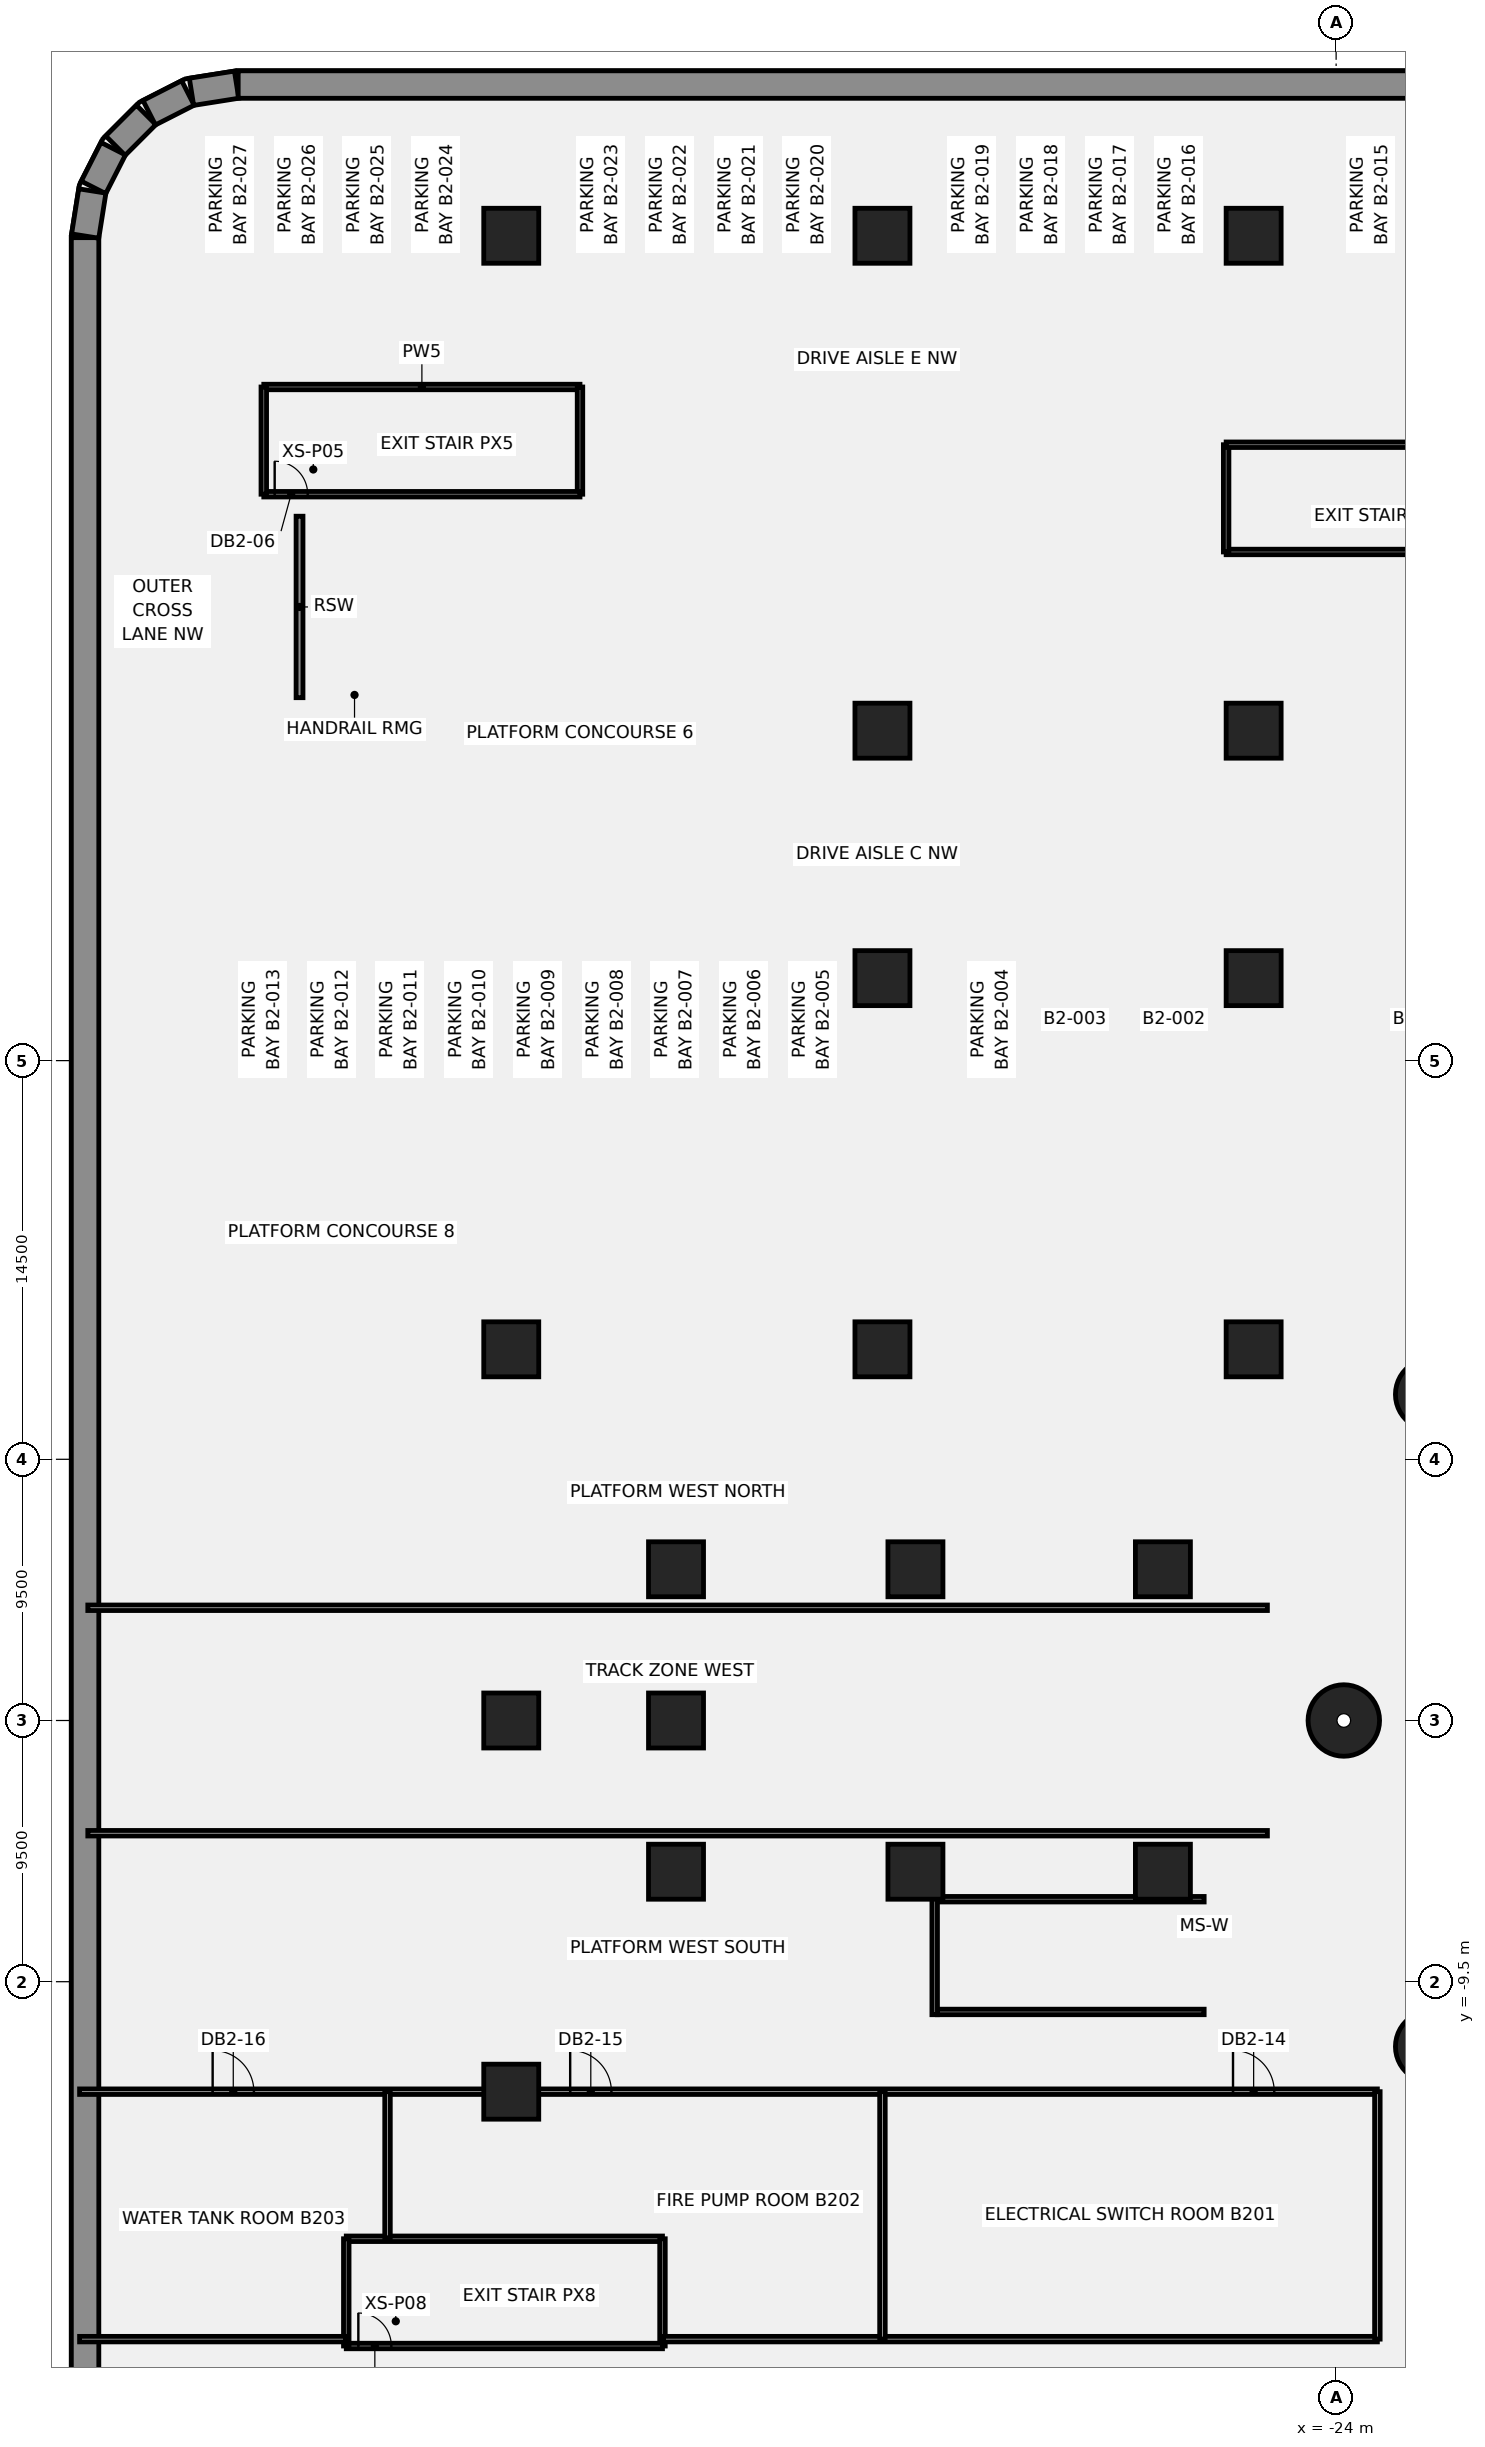
"""IFC4 building model, lengths in metres.
Left out: names, types, materials, properties, quantities, classifications, styles, units other than length and angle.
Written with IfcOpenShell. Run it as: python <this file> out.ifc"""

import sys

from ifc_helpers import new_model, si_unit, direction, frame, frame_2d, origin, origin_2d, place, context, subcontext, project, spatial, rectangle, circle, extrude, element, fill, save


model = new_model("IFC4")
c1 = context("Model", 3, precision=1e-05, world=origin(), true_north=direction((0.0, 1.0)))
c2 = subcontext(c1, "Body", "Model", "MODEL_VIEW")
j1 = project(units=[si_unit("LENGTHUNIT", "METRE"), si_unit("PLANEANGLEUNIT", "RADIAN")], contexts=[c1])
p1 = place(None, origin())
s1 = spatial("IfcSite", under=j1, at=p1, CompositionType="ELEMENT")
p2 = place(p1, origin())
s2 = spatial("IfcBuilding", under=s1, at=p2, CompositionType="ELEMENT")
p3 = place(p2, frame((0.0, 0.0, -14.0)))
s3 = spatial("IfcBuildingStorey", under=s2, at=p3, CompositionType="ELEMENT", Elevation=-14.0)
p4 = place(p3, frame((-69.5, -53.931, -0.45), z_axis=(0.0, 0.0, 1.0), x_axis=(0.0, 1.0, 0.0)))
e1 = element("IfcWall", 1, at=p4, inside=s3, PredefinedType="SOLIDWALL", context=c2, shape_type="SweptSolid", body=[
    extrude(rectangle(XDim=107.863, YDim=1.0, at=frame_2d((53.931, 0.0))), origin(), (0.0, 0.0, 1.0), 7.0),
])
p5 = place(p3, frame((-69.495, 53.99, -0.45), z_axis=(0.0, 0.0, 1.0), x_axis=(0.156430639922, 0.987688946427, 0.0)))
e2 = element("IfcWall", 2, at=p5, inside=s3, PredefinedType="SOLIDWALL", context=c2, shape_type="SweptSolid", body=[
    extrude(rectangle(XDim=1.661, YDim=1.0, at=frame_2d((0.83, 0.0))), origin(), (0.0, 0.0, 1.0), 7.0),
])
for number, where, z_axis, x_axis in (
    (3, (-69.194, 55.759, -0.45), (0.0, 0.0, 1.0), (0.454, 0.891, 0.0)),
    (4, (-68.396, 57.278, -0.45), (0.0, 0.0, 1.0), (0.707, 0.707, 0.0)),
    (5, (-67.168, 58.476, -0.45), (0.0, 0.0, 1.0), (0.891, 0.454, 0.0)),
):
    element("IfcWall", number, at=place(p3, frame(where, z_axis=z_axis, x_axis=x_axis)), inside=s3, PredefinedType="SOLIDWALL", context=c2, shape_type="SweptSolid", body=[
        extrude(rectangle(XDim=1.581, YDim=1.0, at=frame_2d((0.791, 0.0))), origin(), (0.0, 0.0, 1.0), 7.0),
    ])
p6 = place(p3, frame((-65.63, 59.236, -0.45), z_axis=(0.0, 0.0, 1.0), x_axis=(0.987688946427, 0.156430639922, 0.0)))
e6 = element("IfcWall", 6, at=p6, inside=s3, PredefinedType="SOLIDWALL", context=c2, shape_type="SweptSolid", body=[
    extrude(rectangle(XDim=1.661, YDim=1.0, at=frame_2d((0.83, 0.0))), origin(), (0.0, 0.0, 1.0), 7.0),
])
p7 = place(p3, frame((-63.931, 59.5, -0.45), z_axis=(0.0, 0.0, 1.0), x_axis=(1.0, 0.0, 0.0)))
e7 = element("IfcWall", 7, at=p7, inside=s3, PredefinedType="SOLIDWALL", context=c2, shape_type="SweptSolid", body=[
    extrude(rectangle(XDim=127.863, YDim=1.0, at=frame_2d((63.931, 0.0))), origin(), (0.0, 0.0, 1.0), 7.0),
])
for number, where, z_axis, x_axis in (
    (8, (-20.543, 11.86, -0.45), (0.0, 0.0, 1.0), (1.0, 0.0, 0.0)),
    (9, (-23.721, 0.0, -0.45), (0.0, 0.0, 1.0), (1.0, 0.0, 0.0)),
    (10, (-20.543, -11.86, -0.45), (0.0, 0.0, 1.0), (1.0, 0.0, 0.0)),
):
    element("IfcColumn", number, at=place(p3, frame(where, z_axis=z_axis, x_axis=x_axis)), inside=s3, PredefinedType="COLUMN", context=c2, shape_type="SweptSolid", body=[
        extrude(circle(Radius=1.3, at=origin_2d()), origin(), (0.0, 0.0, 1.0), 7.0),
    ])
for number, where, z_axis, x_axis in (
    (11, (-39.3, -5.5, -0.45), (0.0, 0.0, 1.0), (1.0, 0.0, 0.0)),
    (12, (-39.3, 5.5, -0.45), (0.0, 0.0, 1.0), (1.0, 0.0, 0.0)),
    (13, (-30.3, -5.5, -0.45), (0.0, 0.0, 1.0), (1.0, 0.0, 0.0)),
    (14, (-30.3, 5.5, -0.45), (0.0, 0.0, 1.0), (1.0, 0.0, 0.0)),
    (15, (-48.008, 5.5, -0.45), (0.0, 0.0, 1.0), (1.0, 0.0, 0.0)),
    (16, (-48.008, 0.0, -0.45), (0.0, 0.0, 1.0), (1.0, 0.0, 0.0)),
    (17, (-48.008, -5.5, -0.45), (0.0, 0.0, 1.0), (1.0, 0.0, 0.0)),
    (18, (-54.0, -13.5, -0.45), (0.0, 0.0, 1.0), (1.0, 0.0, 0.0)),
    (19, (-54.0, 0.0, -0.45), (0.0, 0.0, 1.0), (1.0, 0.0, 0.0)),
    (20, (-54.0, 13.5, -0.45), (0.0, 0.0, 1.0), (1.0, 0.0, 0.0)),
    (21, (-54.0, 54.0, -0.45), (0.0, 0.0, 1.0), (1.0, 0.0, 0.0)),
    (22, (-40.5, 13.5, -0.45), (0.0, 0.0, 1.0), (1.0, 0.0, 0.0)),
    (23, (-40.5, 27.0, -0.45), (0.0, 0.0, 1.0), (1.0, 0.0, 0.0)),
    (24, (-40.5, 36.0, -0.45), (0.0, 0.0, 1.0), (1.0, 0.0, 0.0)),
    (25, (-40.5, 54.0, -0.45), (0.0, 0.0, 1.0), (1.0, 0.0, 0.0)),
    (26, (-27.0, 13.5, -0.45), (0.0, 0.0, 1.0), (1.0, 0.0, 0.0)),
    (27, (-27.0, 27.0, -0.45), (0.0, 0.0, 1.0), (1.0, 0.0, 0.0)),
    (28, (-27.0, 36.0, -0.45), (0.0, 0.0, 1.0), (1.0, 0.0, 0.0)),
    (29, (-27.0, 54.0, -0.45), (0.0, 0.0, 1.0), (1.0, 0.0, 0.0)),
):
    element("IfcColumn", number, at=place(p3, frame(where, z_axis=z_axis, x_axis=x_axis)), inside=s3, PredefinedType="COLUMN", context=c2, shape_type="SweptSolid", body=[
        extrude(rectangle(XDim=2.0, YDim=2.0, at=origin_2d()), origin(), (0.0, 0.0, 1.0), 7.0),
    ])
p8 = place(p3, frame((-63.0, 48.5, 0.0), z_axis=(0.0, 0.0, 1.0), x_axis=(1.0, 0.0, 0.0)))
e30 = element("IfcWall", 30, at=p8, inside=s3, PredefinedType="PARTITIONING", context=c2, shape_type="SweptSolid", body=[
    extrude(rectangle(XDim=11.5, YDim=0.2, at=frame_2d((5.75, 0.0))), origin(), (0.0, 0.0, 1.0), 6.55),
])
p9 = place(p3, frame((-51.5, 44.6, 0.0), z_axis=(0.0, 0.0, 1.0), x_axis=(0.0, 1.0, 0.0)))
e31 = element("IfcWall", 31, at=p9, inside=s3, PredefinedType="PARTITIONING", context=c2, shape_type="SweptSolid", body=[
    extrude(rectangle(XDim=3.9, YDim=0.2, at=frame_2d((1.95, 0.0))), origin(), (0.0, 0.0, 1.0), 6.55),
])
p10 = place(p3, frame((-63.0, 44.6, 0.0), z_axis=(0.0, 0.0, 1.0), x_axis=(1.0, 0.0, 0.0)))
e32 = element("IfcWall", 32, at=p10, inside=s3, PredefinedType="PARTITIONING", context=c2, shape_type="SweptSolid", body=[
    extrude(rectangle(XDim=11.5, YDim=0.2, at=frame_2d((5.75, 0.0))), origin(), (0.0, 0.0, 1.0), 6.55),
])
p11 = place(p10, frame((0.396, 0.0, 0.0)))
e33 = element("IfcOpeningElement", 33, at=p11, cuts=e32, PredefinedType="OPENING", context=c2, shape_type="SweptSolid", body=[
    extrude(rectangle(XDim=1.2, YDim=2.1, at=frame_2d((0.6, 1.05))), frame((0.0, 0.11, 0.0), z_axis=(0.0, -1.0, 0.0), x_axis=(1.0, 0.0, 0.0)), (0.0, 0.0, 1.0), 0.22),
])
p12 = place(p3, frame((-63.0, 44.6, 0.0), z_axis=(0.0, 0.0, 1.0), x_axis=(0.0, 1.0, 0.0)))
e34 = element("IfcWall", 34, at=p12, inside=s3, PredefinedType="PARTITIONING", context=c2, shape_type="SweptSolid", body=[
    extrude(rectangle(XDim=3.9, YDim=0.2, at=frame_2d((1.95, 0.0))), origin(), (0.0, 0.0, 1.0), 6.55),
])
p13 = place(p3, frame((-60.0, -18.85, 0.0), z_axis=(0.0, 0.0, 1.0), x_axis=(1.0, 0.0, 0.0)))
e35 = element("IfcWall", 35, at=p13, inside=s3, PredefinedType="PARTITIONING", context=c2, shape_type="SweptSolid", body=[
    extrude(rectangle(XDim=11.5, YDim=0.2, at=frame_2d((5.75, 0.0))), origin(), (0.0, 0.0, 1.0), 6.55),
])
p14 = place(p3, frame((-48.5, -22.75, 0.0), z_axis=(0.0, 0.0, 1.0), x_axis=(0.0, 1.0, 0.0)))
e36 = element("IfcWall", 36, at=p14, inside=s3, PredefinedType="PARTITIONING", context=c2, shape_type="SweptSolid", body=[
    extrude(rectangle(XDim=3.9, YDim=0.2, at=frame_2d((1.95, 0.0))), origin(), (0.0, 0.0, 1.0), 6.55),
])
p15 = place(p3, frame((-60.0, -22.75, 0.0), z_axis=(0.0, 0.0, 1.0), x_axis=(1.0, 0.0, 0.0)))
e37 = element("IfcWall", 37, at=p15, inside=s3, PredefinedType="PARTITIONING", context=c2, shape_type="SweptSolid", body=[
    extrude(rectangle(XDim=11.5, YDim=0.2, at=frame_2d((5.75, 0.0))), origin(), (0.0, 0.0, 1.0), 6.55),
])
p16 = place(p15, frame((0.439, 0.0, 0.0)))
e38 = element("IfcOpeningElement", 38, at=p16, cuts=e37, PredefinedType="OPENING", context=c2, shape_type="SweptSolid", body=[
    extrude(rectangle(XDim=1.2, YDim=2.1, at=frame_2d((0.6, 1.05))), frame((0.0, 0.11, 0.0), z_axis=(0.0, -1.0, 0.0), x_axis=(1.0, 0.0, 0.0)), (0.0, 0.0, 1.0), 0.22),
])
p17 = place(p3, frame((-60.0, -22.75, 0.0), z_axis=(0.0, 0.0, 1.0), x_axis=(0.0, 1.0, 0.0)))
e39 = element("IfcWall", 39, at=p17, inside=s3, PredefinedType="PARTITIONING", context=c2, shape_type="SweptSolid", body=[
    extrude(rectangle(XDim=3.9, YDim=0.2, at=frame_2d((1.95, 0.0))), origin(), (0.0, 0.0, 1.0), 6.55),
])
p18 = place(p3, frame((-28.0, 42.5, 0.0), z_axis=(0.0, 0.0, 1.0), x_axis=(1.0, 0.0, 0.0)))
e40 = element("IfcWall", 40, at=p18, inside=s3, PredefinedType="PARTITIONING", context=c2, shape_type="SweptSolid", body=[
    extrude(rectangle(XDim=11.5, YDim=0.2, at=frame_2d((5.75, 0.0))), origin(), (0.0, 0.0, 1.0), 6.55),
])
p19 = place(p3, frame((-28.0, 42.5, 0.0), z_axis=(0.0, 0.0, 1.0), x_axis=(0.0, 1.0, 0.0)))
e41 = element("IfcWall", 41, at=p19, inside=s3, PredefinedType="PARTITIONING", context=c2, shape_type="SweptSolid", body=[
    extrude(rectangle(XDim=3.9, YDim=0.2, at=frame_2d((1.95, 0.0))), origin(), (0.0, 0.0, 1.0), 6.55),
])
p20 = place(p3, frame((-28.0, 46.4, 0.0), z_axis=(0.0, 0.0, 1.0), x_axis=(1.0, 0.0, 0.0)))
e42 = element("IfcWall", 42, at=p20, inside=s3, PredefinedType="PARTITIONING", context=c2, shape_type="SweptSolid", body=[
    extrude(rectangle(XDim=11.5, YDim=0.2, at=frame_2d((5.75, 0.0))), origin(), (0.0, 0.0, 1.0), 6.55),
])
p21 = place(p3, frame((-69.699, -22.5, 0.0), z_axis=(0.0, 0.0, 1.0), x_axis=(1.0, 0.0, 0.0)))
e43 = element("IfcWall", 43, at=p21, inside=s3, PredefinedType="PARTITIONING", context=c2, shape_type="SweptSolid", body=[
    extrude(rectangle(XDim=9.669, YDim=0.2, at=frame_2d((4.834, 0.0))), origin(), (0.0, 0.0, 1.0), 6.55),
])
p22 = place(p3, frame((-69.699, -13.5, 0.0), z_axis=(0.0, 0.0, 1.0), x_axis=(1.0, 0.0, 0.0)))
e44 = element("IfcWall", 44, at=p22, inside=s3, PredefinedType="PARTITIONING", context=c2, shape_type="SweptSolid", body=[
    extrude(rectangle(XDim=47.199, YDim=0.2, at=frame_2d((23.6, 0.0))), origin(), (0.0, 0.0, 1.0), 6.55),
])
p23 = place(p22, frame((41.949, 0.0, 0.0)))
e45 = element("IfcOpeningElement", 45, at=p23, cuts=e44, PredefinedType="OPENING", context=c2, shape_type="SweptSolid", body=[
    extrude(rectangle(XDim=1.5, YDim=2.1, at=frame_2d((0.75, 1.05))), frame((0.0, 0.11, 0.0), z_axis=(0.0, -1.0, 0.0), x_axis=(1.0, 0.0, 0.0)), (0.0, 0.0, 1.0), 0.22),
])
p24 = place(p22, frame((17.842, 0.0, 0.0)))
e46 = element("IfcOpeningElement", 46, at=p24, cuts=e44, PredefinedType="OPENING", context=c2, shape_type="SweptSolid", body=[
    extrude(rectangle(XDim=1.5, YDim=2.1, at=frame_2d((0.75, 1.05))), frame((0.0, 0.11, 0.0), z_axis=(0.0, -1.0, 0.0), x_axis=(1.0, 0.0, 0.0)), (0.0, 0.0, 1.0), 0.22),
])
p25 = place(p22, frame((4.839, 0.0, 0.0)))
e47 = element("IfcOpeningElement", 47, at=p25, cuts=e44, PredefinedType="OPENING", context=c2, shape_type="SweptSolid", body=[
    extrude(rectangle(XDim=1.5, YDim=2.1, at=frame_2d((0.75, 1.05))), frame((0.0, 0.11, 0.0), z_axis=(0.0, -1.0, 0.0), x_axis=(1.0, 0.0, 0.0)), (0.0, 0.0, 1.0), 0.22),
])
p26 = place(p3, frame((-58.5, -18.82, 0.0), z_axis=(0.0, 0.0, 1.0), x_axis=(0.0, 1.0, 0.0)))
e48 = element("IfcWall", 48, at=p26, inside=s3, PredefinedType="PARTITIONING", context=c2, shape_type="SweptSolid", body=[
    extrude(rectangle(XDim=5.32, YDim=0.2, at=frame_2d((2.66, 0.0))), origin(), (0.0, 0.0, 1.0), 6.55),
])
p27 = place(p3, frame((-48.47, -22.5, 0.0), z_axis=(0.0, 0.0, 1.0), x_axis=(1.0, 0.0, 0.0)))
e49 = element("IfcWall", 49, at=p27, inside=s3, PredefinedType="PARTITIONING", context=c2, shape_type="SweptSolid", body=[
    extrude(rectangle(XDim=25.97, YDim=0.2, at=frame_2d((12.985, 0.0))), origin(), (0.0, 0.0, 1.0), 6.55),
])
for number, where, z_axis, x_axis in (
    (50, (-22.5, -22.5, 0.0), (0.0, 0.0, 1.0), (0.0, 1.0, 0.0)),
    (51, (-40.5, -22.5, 0.0), (0.0, 0.0, 1.0), (0.0, 1.0, 0.0)),
):
    element("IfcWall", number, at=place(p3, frame(where, z_axis=z_axis, x_axis=x_axis)), inside=s3, PredefinedType="PARTITIONING", context=c2, shape_type="SweptSolid", body=[
        extrude(rectangle(XDim=9.0, YDim=0.2, at=frame_2d((4.5, 0.0))), origin(), (0.0, 0.0, 1.0), 6.55),
    ])
for number, where, z_axis, x_axis in (
    (52, (-69.4, 4.1, 0.0), (0.0, 0.0, 1.0), (1.0, 0.0, 0.0)),
    (53, (-69.4, -4.1, 0.0), (0.0, 0.0, 1.0), (1.0, 0.0, 0.0)),
):
    element("IfcWall", number, at=place(p3, frame(where, z_axis=z_axis, x_axis=x_axis)), inside=s3, PredefinedType="PARTITIONING", context=c2, shape_type="SweptSolid", body=[
        extrude(rectangle(XDim=42.9, YDim=0.2, at=frame_2d((21.45, 0.0))), origin(), (0.0, 0.0, 1.0), 6.55),
    ])
for number, where, z_axis, x_axis in (
    (54, (-28.8, -6.5, 0.0), (0.0, 0.0, 1.0), (-1.0, 0.0, 0.0)),
    (55, (-28.8, -10.6, 0.0), (0.0, 0.0, 1.0), (-1.0, 0.0, 0.0)),
):
    element("IfcWall", number, at=place(p3, frame(where, z_axis=z_axis, x_axis=x_axis)), inside=s3, PredefinedType="SOLIDWALL", context=c2, shape_type="SweptSolid", body=[
        extrude(rectangle(XDim=9.7, YDim=0.2, at=frame_2d((4.85, 0.0))), origin(), (0.0, 0.0, 1.0), 6.55),
    ])
p28 = place(p3, frame((-38.6, -6.4, 0.0), z_axis=(0.0, 0.0, 1.0), x_axis=(0.0, -1.0, 0.0)))
e56 = element("IfcWall", 56, at=p28, inside=s3, PredefinedType="SOLIDWALL", context=c2, shape_type="SweptSolid", body=[
    extrude(rectangle(XDim=4.3, YDim=0.2, at=frame_2d((2.15, 0.0))), origin(), (0.0, 0.0, 1.0), 6.55),
])
p29 = place(p3, frame((-61.7, 37.2, 0.0), z_axis=(0.0, 0.0, 1.0), x_axis=(0.0, 1.0, 0.0)))
e57 = element("IfcWall", 57, at=p29, inside=s3, PredefinedType="SOLIDWALL", context=c2, shape_type="SweptSolid", body=[
    extrude(rectangle(XDim=6.6, YDim=0.25, at=frame_2d((3.3, 0.0))), origin(), (0.0, 0.0, 1.0), 6.483),
])
p30 = place(p11, origin())
e58 = element("IfcDoor", 58, at=p30, inside=s3, OperationType="SINGLE_SWING_RIGHT", PredefinedType="DOOR", context=c2, shape_type="SweptSolid", body=[
    extrude(rectangle(XDim=1.2, YDim=2.1, at=frame_2d((0.6, 1.05))), frame((0.0, 0.025, 0.0), z_axis=(0.0, -1.0, 0.0), x_axis=(1.0, 0.0, 0.0)), (0.0, 0.0, 1.0), 0.05),
])
fill(e33, e58)
p31 = place(p16, origin())
e59 = element("IfcDoor", 59, at=p31, inside=s3, OperationType="SINGLE_SWING_LEFT", PredefinedType="DOOR", context=c2, shape_type="SweptSolid", body=[
    extrude(rectangle(XDim=1.2, YDim=2.1, at=frame_2d((0.6, 1.05))), frame((0.0, 0.025, 0.0), z_axis=(0.0, -1.0, 0.0), x_axis=(1.0, 0.0, 0.0)), (0.0, 0.0, 1.0), 0.05),
])
fill(e38, e59)
p32 = place(p23, origin())
e60 = element("IfcDoor", 60, at=p32, inside=s3, OperationType="SINGLE_SWING_RIGHT", PredefinedType="DOOR", context=c2, shape_type="SweptSolid", body=[
    extrude(rectangle(XDim=1.5, YDim=2.1, at=frame_2d((0.75, 1.05))), frame((0.0, 0.025, 0.0), z_axis=(0.0, -1.0, 0.0), x_axis=(1.0, 0.0, 0.0)), (0.0, 0.0, 1.0), 0.05),
])
fill(e45, e60)
p33 = place(p24, origin())
e61 = element("IfcDoor", 61, at=p33, inside=s3, OperationType="SINGLE_SWING_LEFT", PredefinedType="DOOR", context=c2, shape_type="SweptSolid", body=[
    extrude(rectangle(XDim=1.5, YDim=2.1, at=frame_2d((0.75, 1.05))), frame((0.0, 0.025, 0.0), z_axis=(0.0, -1.0, 0.0), x_axis=(1.0, 0.0, 0.0)), (0.0, 0.0, 1.0), 0.05),
])
fill(e46, e61)
p34 = place(p25, origin())
e62 = element("IfcDoor", 62, at=p34, inside=s3, OperationType="SINGLE_SWING_RIGHT", PredefinedType="DOOR", context=c2, shape_type="SweptSolid", body=[
    extrude(rectangle(XDim=1.5, YDim=2.1, at=frame_2d((0.75, 1.05))), frame((0.0, 0.025, 0.0), z_axis=(0.0, -1.0, 0.0), x_axis=(1.0, 0.0, 0.0)), (0.0, 0.0, 1.0), 0.05),
])
fill(e47, e62)
save(model, sys.argv[1])
